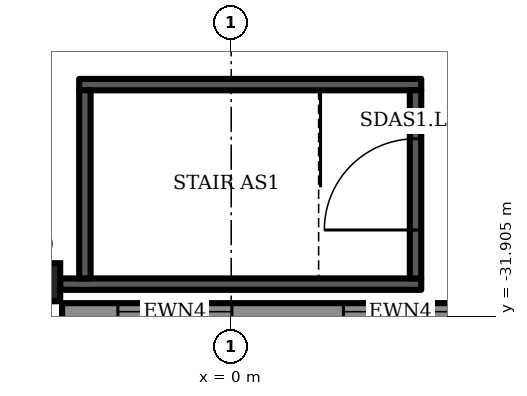
"""IFC4 building model, lengths in metres.
Left out: names, types, materials, properties, quantities, classifications, styles, units other than length and angle.
Written with IfcOpenShell. Run it as: python <this file> out.ifc"""

import sys

from ifc_helpers import new_model, si_unit, direction, frame, frame_2d, origin, origin_2d, place, context, subcontext, project, spatial, rectangle, extrude, element, fill, save


model = new_model("IFC4")
c1 = context("Model", 3, precision=1e-05, world=origin(), true_north=direction((0.0, 1.0)))
c2 = subcontext(c1, "Body", "Model", "MODEL_VIEW")
j1 = project(units=[si_unit("LENGTHUNIT", "METRE"), si_unit("PLANEANGLEUNIT", "RADIAN")], contexts=[c1])
p1 = place(None, origin())
s1 = spatial("IfcSite", under=j1, at=p1, CompositionType="ELEMENT")
p2 = place(p1, origin())
s2 = spatial("IfcBuilding", under=s1, at=p2, CompositionType="ELEMENT")
p3 = place(p2, frame((0.0, 0.0, 27.5)))
s3 = spatial("IfcBuildingStorey", under=s2, at=p3, CompositionType="ELEMENT", Elevation=27.5)
p4 = place(p3, frame((-5.0, -31.0, 0.0), z_axis=(0.0, 0.0, 1.0), x_axis=(1.0, 0.0, 0.0)))
e1 = element("IfcColumn", 1, at=p4, inside=s3, PredefinedType="COLUMN", context=c2, shape_type="SweptSolid", body=[
    extrude(rectangle(XDim=1.0, YDim=1.0, at=origin_2d()), origin(), (0.0, 0.0, 1.0), 5.5),
])
p5 = place(p3, frame((-4.45, -31.775, 0.0), z_axis=(0.0, 0.0, 1.0), x_axis=(1.0, 0.0, 0.0)))
e2 = element("IfcWall", 2, at=p5, inside=s3, PredefinedType="SOLIDWALL", context=c2, shape_type="SweptSolid", body=[
    extrude(rectangle(XDim=100.9, YDim=0.45, at=frame_2d((50.45, 0.0))), origin(), (0.0, 0.0, 1.0), 5.2),
])
p6 = place(p5, frame((1.468, 0.0, 1.0)))
e3 = element("IfcOpeningElement", 3, at=p6, cuts=e2, PredefinedType="OPENING", context=c2, shape_type="SweptSolid", body=[
    extrude(rectangle(XDim=3.0, YDim=3.2, at=frame_2d((1.5, 1.6))), frame((0.0, 0.235, 0.0), z_axis=(0.0, -1.0, 0.0), x_axis=(1.0, 0.0, 0.0)), (0.0, 0.0, 1.0), 0.47),
])
p7 = place(p5, frame((7.403, 0.0, 1.0)))
e4 = element("IfcOpeningElement", 4, at=p7, cuts=e2, PredefinedType="OPENING", context=c2, shape_type="SweptSolid", body=[
    extrude(rectangle(XDim=3.0, YDim=3.2, at=frame_2d((1.5, 1.6))), frame((0.0, 0.235, 0.0), z_axis=(0.0, -1.0, 0.0), x_axis=(1.0, 0.0, 0.0)), (0.0, 0.0, 1.0), 0.47),
])
p8 = place(p5, frame((13.338, 0.0, 1.0)))
e5 = element("IfcOpeningElement", 5, at=p8, cuts=e2, PredefinedType="OPENING", context=c2, shape_type="SweptSolid", body=[
    extrude(rectangle(XDim=3.0, YDim=3.2, at=frame_2d((1.5, 1.6))), frame((0.0, 0.235, 0.0), z_axis=(0.0, -1.0, 0.0), x_axis=(1.0, 0.0, 0.0)), (0.0, 0.0, 1.0), 0.47),
])
p9 = place(p5, frame((19.273, 0.0, 1.0)))
e6 = element("IfcOpeningElement", 6, at=p9, cuts=e2, PredefinedType="OPENING", context=c2, shape_type="SweptSolid", body=[
    extrude(rectangle(XDim=3.0, YDim=3.2, at=frame_2d((1.5, 1.6))), frame((0.0, 0.235, 0.0), z_axis=(0.0, -1.0, 0.0), x_axis=(1.0, 0.0, 0.0)), (0.0, 0.0, 1.0), 0.47),
])
p10 = place(p5, frame((25.209, 0.0, 1.0)))
e7 = element("IfcOpeningElement", 7, at=p10, cuts=e2, PredefinedType="OPENING", context=c2, shape_type="SweptSolid", body=[
    extrude(rectangle(XDim=3.0, YDim=3.2, at=frame_2d((1.5, 1.6))), frame((0.0, 0.235, 0.0), z_axis=(0.0, -1.0, 0.0), x_axis=(1.0, 0.0, 0.0)), (0.0, 0.0, 1.0), 0.47),
])
p11 = place(p5, frame((31.144, 0.0, 1.0)))
e8 = element("IfcOpeningElement", 8, at=p11, cuts=e2, PredefinedType="OPENING", context=c2, shape_type="SweptSolid", body=[
    extrude(rectangle(XDim=3.0, YDim=3.2, at=frame_2d((1.5, 1.6))), frame((0.0, 0.235, 0.0), z_axis=(0.0, -1.0, 0.0), x_axis=(1.0, 0.0, 0.0)), (0.0, 0.0, 1.0), 0.47),
])
p12 = place(p5, frame((37.079, 0.0, 1.0)))
e9 = element("IfcOpeningElement", 9, at=p12, cuts=e2, PredefinedType="OPENING", context=c2, shape_type="SweptSolid", body=[
    extrude(rectangle(XDim=3.0, YDim=3.2, at=frame_2d((1.5, 1.6))), frame((0.0, 0.235, 0.0), z_axis=(0.0, -1.0, 0.0), x_axis=(1.0, 0.0, 0.0)), (0.0, 0.0, 1.0), 0.47),
])
p13 = place(p5, frame((43.015, 0.0, 1.0)))
e10 = element("IfcOpeningElement", 10, at=p13, cuts=e2, PredefinedType="OPENING", context=c2, shape_type="SweptSolid", body=[
    extrude(rectangle(XDim=3.0, YDim=3.2, at=frame_2d((1.5, 1.6))), frame((0.0, 0.235, 0.0), z_axis=(0.0, -1.0, 0.0), x_axis=(1.0, 0.0, 0.0)), (0.0, 0.0, 1.0), 0.47),
])
p14 = place(p5, frame((48.95, 0.0, 1.0)))
e11 = element("IfcOpeningElement", 11, at=p14, cuts=e2, PredefinedType="OPENING", context=c2, shape_type="SweptSolid", body=[
    extrude(rectangle(XDim=3.0, YDim=3.2, at=frame_2d((1.5, 1.6))), frame((0.0, 0.235, 0.0), z_axis=(0.0, -1.0, 0.0), x_axis=(1.0, 0.0, 0.0)), (0.0, 0.0, 1.0), 0.47),
])
p15 = place(p5, frame((54.885, 0.0, 1.0)))
e12 = element("IfcOpeningElement", 12, at=p15, cuts=e2, PredefinedType="OPENING", context=c2, shape_type="SweptSolid", body=[
    extrude(rectangle(XDim=3.0, YDim=3.2, at=frame_2d((1.5, 1.6))), frame((0.0, 0.235, 0.0), z_axis=(0.0, -1.0, 0.0), x_axis=(1.0, 0.0, 0.0)), (0.0, 0.0, 1.0), 0.47),
])
p16 = place(p5, frame((60.821, 0.0, 1.0)))
e13 = element("IfcOpeningElement", 13, at=p16, cuts=e2, PredefinedType="OPENING", context=c2, shape_type="SweptSolid", body=[
    extrude(rectangle(XDim=3.0, YDim=3.2, at=frame_2d((1.5, 1.6))), frame((0.0, 0.235, 0.0), z_axis=(0.0, -1.0, 0.0), x_axis=(1.0, 0.0, 0.0)), (0.0, 0.0, 1.0), 0.47),
])
p17 = place(p5, frame((66.756, 0.0, 1.0)))
e14 = element("IfcOpeningElement", 14, at=p17, cuts=e2, PredefinedType="OPENING", context=c2, shape_type="SweptSolid", body=[
    extrude(rectangle(XDim=3.0, YDim=3.2, at=frame_2d((1.5, 1.6))), frame((0.0, 0.235, 0.0), z_axis=(0.0, -1.0, 0.0), x_axis=(1.0, 0.0, 0.0)), (0.0, 0.0, 1.0), 0.47),
])
p18 = place(p5, frame((72.691, 0.0, 1.0)))
e15 = element("IfcOpeningElement", 15, at=p18, cuts=e2, PredefinedType="OPENING", context=c2, shape_type="SweptSolid", body=[
    extrude(rectangle(XDim=3.0, YDim=3.2, at=frame_2d((1.5, 1.6))), frame((0.0, 0.235, 0.0), z_axis=(0.0, -1.0, 0.0), x_axis=(1.0, 0.0, 0.0)), (0.0, 0.0, 1.0), 0.47),
])
p19 = place(p5, frame((78.626, 0.0, 1.0)))
e16 = element("IfcOpeningElement", 16, at=p19, cuts=e2, PredefinedType="OPENING", context=c2, shape_type="SweptSolid", body=[
    extrude(rectangle(XDim=3.0, YDim=3.2, at=frame_2d((1.5, 1.6))), frame((0.0, 0.235, 0.0), z_axis=(0.0, -1.0, 0.0), x_axis=(1.0, 0.0, 0.0)), (0.0, 0.0, 1.0), 0.47),
])
p20 = place(p5, frame((84.562, 0.0, 1.0)))
e17 = element("IfcOpeningElement", 17, at=p20, cuts=e2, PredefinedType="OPENING", context=c2, shape_type="SweptSolid", body=[
    extrude(rectangle(XDim=3.0, YDim=3.2, at=frame_2d((1.5, 1.6))), frame((0.0, 0.235, 0.0), z_axis=(0.0, -1.0, 0.0), x_axis=(1.0, 0.0, 0.0)), (0.0, 0.0, 1.0), 0.47),
])
p21 = place(p5, frame((90.497, 0.0, 1.0)))
e18 = element("IfcOpeningElement", 18, at=p21, cuts=e2, PredefinedType="OPENING", context=c2, shape_type="SweptSolid", body=[
    extrude(rectangle(XDim=3.0, YDim=3.2, at=frame_2d((1.5, 1.6))), frame((0.0, 0.235, 0.0), z_axis=(0.0, -1.0, 0.0), x_axis=(1.0, 0.0, 0.0)), (0.0, 0.0, 1.0), 0.47),
])
p22 = place(p5, frame((96.432, 0.0, 1.0)))
e19 = element("IfcOpeningElement", 19, at=p22, cuts=e2, PredefinedType="OPENING", context=c2, shape_type="SweptSolid", body=[
    extrude(rectangle(XDim=3.0, YDim=3.2, at=frame_2d((1.5, 1.6))), frame((0.0, 0.235, 0.0), z_axis=(0.0, -1.0, 0.0), x_axis=(1.0, 0.0, 0.0)), (0.0, 0.0, 1.0), 0.47),
])
p23 = place(p3, frame((-4.5, -31.05, 0.0), z_axis=(0.0, 0.0, 1.0), x_axis=(1.0, 0.0, 0.0)))
e20 = element("IfcWall", 20, at=p23, inside=s3, PredefinedType="SHEAR", context=c2, shape_type="SweptSolid", body=[
    extrude(rectangle(XDim=9.5, YDim=0.3, at=frame_2d((4.75, 0.0))), origin(), (0.0, 0.0, 1.0), 5.2),
])
p24 = place(p3, frame((-4.0, -25.8, 0.0), z_axis=(0.0, 0.0, 1.0), x_axis=(1.0, 0.0, 0.0)))
e21 = element("IfcWall", 21, at=p24, inside=s3, PredefinedType="SHEAR", context=c2, shape_type="SweptSolid", body=[
    extrude(rectangle(XDim=9.0, YDim=0.3, at=frame_2d((4.5, 0.0))), origin(), (0.0, 0.0, 1.0), 5.2),
])
p25 = place(p3, frame((-3.85, -30.9, 0.0), z_axis=(0.0, 0.0, 1.0), x_axis=(0.0, 1.0, 0.0)))
e22 = element("IfcWall", 22, at=p25, inside=s3, PredefinedType="SHEAR", context=c2, shape_type="SweptSolid", body=[
    extrude(rectangle(XDim=4.95, YDim=0.3, at=frame_2d((2.475, 0.0))), origin(), (0.0, 0.0, 1.0), 5.2),
])
p26 = place(p3, frame((4.85, -30.9, 0.0), z_axis=(0.0, 0.0, 1.0), x_axis=(0.0, 1.0, 0.0)))
e23 = element("IfcWall", 23, at=p26, inside=s3, PredefinedType="SHEAR", context=c2, shape_type="SweptSolid", body=[
    extrude(rectangle(XDim=4.95, YDim=0.3, at=frame_2d((2.475, 0.0))), origin(), (0.0, 0.0, 1.0), 5.2),
])
p27 = place(p26, frame((1.275, 0.0, 0.0)))
e24 = element("IfcOpeningElement", 24, at=p27, cuts=e23, PredefinedType="OPENING", context=c2, shape_type="SweptSolid", body=[
    extrude(rectangle(XDim=2.4, YDim=2.1, at=frame_2d((1.2, 1.05))), frame((0.0, 0.16, 0.0), z_axis=(0.0, -1.0, 0.0), x_axis=(1.0, 0.0, 0.0)), (0.0, 0.0, 1.0), 0.32),
])
p28 = place(p6, origin())
e25 = element("IfcWindow", 25, at=p28, inside=s3, PartitioningType="SINGLE_PANEL", PredefinedType="WINDOW", context=c2, shape_type="SweptSolid", body=[
    extrude(rectangle(XDim=3.0, YDim=3.2, at=frame_2d((1.5, 1.6))), frame((0.0, 0.105, 0.0), z_axis=(0.0, -1.0, 0.0), x_axis=(1.0, 0.0, 0.0)), (0.0, 0.0, 1.0), 0.06),
])
fill(e3, e25)
p29 = place(p7, origin())
e26 = element("IfcWindow", 26, at=p29, inside=s3, PartitioningType="SINGLE_PANEL", PredefinedType="WINDOW", context=c2, shape_type="SweptSolid", body=[
    extrude(rectangle(XDim=3.0, YDim=3.2, at=frame_2d((1.5, 1.6))), frame((0.0, 0.105, 0.0), z_axis=(0.0, -1.0, 0.0), x_axis=(1.0, 0.0, 0.0)), (0.0, 0.0, 1.0), 0.06),
])
fill(e4, e26)
p30 = place(p27, origin())
e27 = element("IfcDoor", 27, at=p30, inside=s3, OperationType="DOUBLE_DOOR_SINGLE_SWING", PredefinedType="DOOR", context=c2, shape_type="SweptSolid", body=[
    extrude(rectangle(XDim=2.4, YDim=2.1, at=frame_2d((1.2, 1.05))), frame((0.0, 0.025, 0.0), z_axis=(0.0, -1.0, 0.0), x_axis=(1.0, 0.0, 0.0)), (0.0, 0.0, 1.0), 0.05),
])
fill(e24, e27)
save(model, sys.argv[1])
